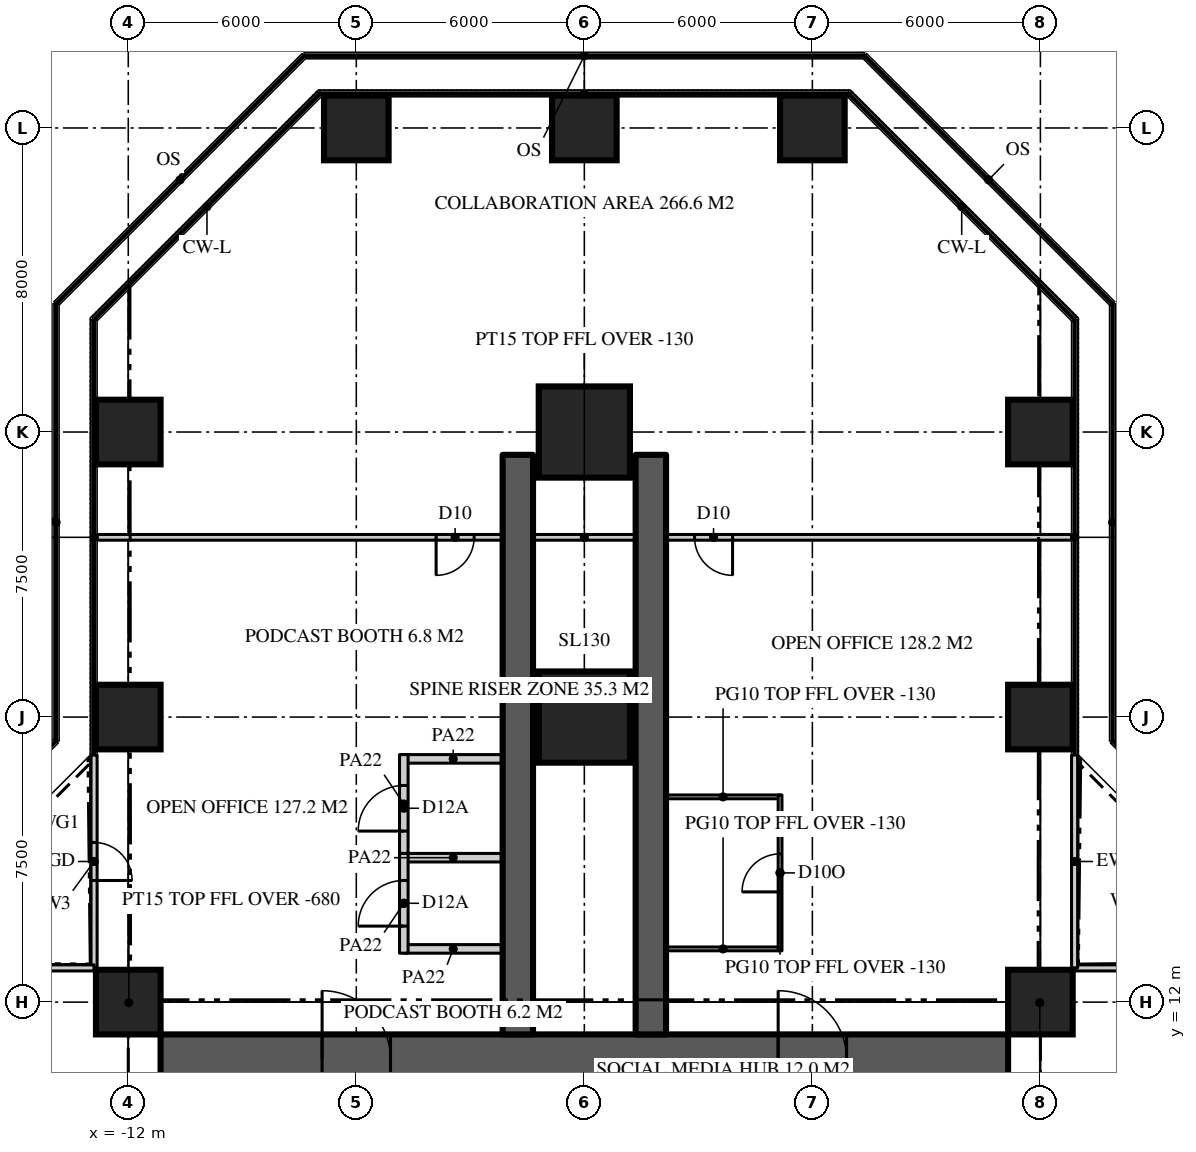
"""IFC4 building model, lengths in metres.
Left out: names, types, materials, properties, quantities, classifications, styles, units other than length and angle.
Written with IfcOpenShell. Run it as: python <this file> out.ifc"""

import sys

from ifc_helpers import new_model, si_unit, direction, frame, frame_2d, origin, origin_2d, place, context, subcontext, project, spatial, rectangle, extrude, element, fill, save


model = new_model("IFC4")
c1 = context("Model", 3, precision=1e-05, world=origin(), true_north=direction((0.0, 1.0)))
c2 = subcontext(c1, "Body", "Model", "MODEL_VIEW")
j1 = project(units=[si_unit("LENGTHUNIT", "METRE"), si_unit("PLANEANGLEUNIT", "RADIAN")], contexts=[c1])
p1 = place(None, origin())
s1 = spatial("IfcSite", under=j1, at=p1, CompositionType="ELEMENT")
p2 = place(p1, origin())
s2 = spatial("IfcBuilding", under=s1, at=p2, CompositionType="ELEMENT")
p3 = place(p2, frame((0.0, 0.0, 74.7)))
s3 = spatial("IfcBuildingStorey", under=s2, at=p3, CompositionType="ELEMENT", Elevation=74.7)
p4 = place(p3, frame((-11.15, 10.5, 0.0), z_axis=(0.0, 0.0, 1.0), x_axis=(1.0, 0.0, 0.0)))
e1 = element("IfcWall", 1, at=p4, inside=s3, PredefinedType="SHEAR", context=c2, shape_type="SweptSolid", body=[
    extrude(rectangle(XDim=22.3, YDim=1.3, at=frame_2d((11.15, 0.0))), origin(), (0.0, 0.0, 1.0), 3.9),
])
p5 = place(p4, frame((4.25, 0.0, 0.0)))
e2 = element("IfcOpeningElement", 2, at=p5, cuts=e1, PredefinedType="OPENING", context=c2, shape_type="SweptSolid", body=[
    extrude(rectangle(XDim=1.8, YDim=2.2, at=frame_2d((0.9, 1.1))), frame((0.0, 0.66, 0.0), z_axis=(0.0, -1.0, 0.0), x_axis=(1.0, 0.0, 0.0)), (0.0, 0.0, 1.0), 1.32),
])
p6 = place(p4, frame((16.25, 0.0, 0.0)))
e3 = element("IfcOpeningElement", 3, at=p6, cuts=e1, PredefinedType="OPENING", context=c2, shape_type="SweptSolid", body=[
    extrude(rectangle(XDim=1.8, YDim=2.2, at=frame_2d((0.9, 1.1))), frame((0.0, 0.66, 0.0), z_axis=(0.0, -1.0, 0.0), x_axis=(1.0, 0.0, 0.0)), (0.0, 0.0, 1.0), 1.32),
])
for number, where, z_axis, x_axis in (
    (4, (1.75, 11.15, 0.0), (0.0, 0.0, 1.0), (0.0, 1.0, 0.0)),
    (5, (-1.75, 11.15, 0.0), (0.0, 0.0, 1.0), (0.0, 1.0, 0.0)),
):
    element("IfcWall", number, at=place(p3, frame(where, z_axis=z_axis, x_axis=x_axis)), inside=s3, PredefinedType="SHEAR", context=c2, shape_type="SweptSolid", body=[
        extrude(rectangle(XDim=15.25, YDim=0.8, at=frame_2d((7.625, 0.0))), origin(), (0.0, 0.0, 1.0), 3.9),
    ])
for number, where, z_axis, x_axis in (
    (6, (-12.0, 12.0, 0.0), (0.0, 0.0, 1.0), (1.0, 0.0, 0.0)),
    (7, (12.0, 12.0, 0.0), (0.0, 0.0, 1.0), (1.0, 0.0, 0.0)),
    (8, (-12.0, 19.5, 0.0), (0.0, 0.0, 1.0), (1.0, 0.0, 0.0)),
):
    element("IfcColumn", number, at=place(p3, frame(where, z_axis=z_axis, x_axis=x_axis)), inside=s3, PredefinedType="COLUMN", context=c2, shape_type="SweptSolid", body=[
        extrude(rectangle(XDim=1.7, YDim=1.7, at=origin_2d()), origin(), (0.0, 0.0, 1.0), 3.9),
    ])
p7 = place(p3, frame((0.0, 19.5, 0.0), z_axis=(0.0, 0.0, 1.0), x_axis=(1.0, 0.0, 0.0)))
e9 = element("IfcColumn", 9, at=p7, inside=s3, PredefinedType="COLUMN", context=c2, shape_type="SweptSolid", body=[
    extrude(rectangle(XDim=2.4, YDim=2.4, at=origin_2d()), origin(), (0.0, 0.0, 1.0), 3.9),
])
for number, where, z_axis, x_axis in (
    (10, (12.0, 19.5, 0.0), (0.0, 0.0, 1.0), (1.0, 0.0, 0.0)),
    (11, (-12.0, 27.0, 0.0), (0.0, 0.0, 1.0), (1.0, 0.0, 0.0)),
):
    element("IfcColumn", number, at=place(p3, frame(where, z_axis=z_axis, x_axis=x_axis)), inside=s3, PredefinedType="COLUMN", context=c2, shape_type="SweptSolid", body=[
        extrude(rectangle(XDim=1.7, YDim=1.7, at=origin_2d()), origin(), (0.0, 0.0, 1.0), 3.9),
    ])
p8 = place(p3, frame((0.0, 27.0, 0.0), z_axis=(0.0, 0.0, 1.0), x_axis=(1.0, 0.0, 0.0)))
e12 = element("IfcColumn", 12, at=p8, inside=s3, PredefinedType="COLUMN", context=c2, shape_type="SweptSolid", body=[
    extrude(rectangle(XDim=2.4, YDim=2.4, at=origin_2d()), origin(), (0.0, 0.0, 1.0), 3.9),
])
for number, where, z_axis, x_axis in (
    (13, (12.0, 27.0, 0.0), (0.0, 0.0, 1.0), (1.0, 0.0, 0.0)),
    (14, (-6.0, 35.0, 0.0), (0.0, 0.0, 1.0), (1.0, 0.0, 0.0)),
    (15, (0.0, 35.0, 0.0), (0.0, 0.0, 1.0), (1.0, 0.0, 0.0)),
    (16, (6.0, 35.0, 0.0), (0.0, 0.0, 1.0), (1.0, 0.0, 0.0)),
):
    element("IfcColumn", number, at=place(p3, frame(where, z_axis=z_axis, x_axis=x_axis)), inside=s3, PredefinedType="COLUMN", context=c2, shape_type="SweptSolid", body=[
        extrude(rectangle(XDim=1.7, YDim=1.7, at=origin_2d()), origin(), (0.0, 0.0, 1.0), 3.9),
    ])
p9 = place(p3, frame((18.5, 12.9, 0.0), z_axis=(0.0, 0.0, 1.0), x_axis=(-1.0, 0.0, 0.0)))
e17 = element("IfcWall", 17, at=p9, inside=s3, PredefinedType="SOLIDWALL", context=c2, shape_type="SweptSolid", body=[
    extrude(rectangle(XDim=5.6, YDim=0.16, at=frame_2d((2.8, 0.0))), origin(), (0.0, 0.0, 1.0), 3.77),
])
p10 = place(p9, frame((2.3, 0.0, 0.0)))
e18 = element("IfcOpeningElement", 18, at=p10, cuts=e17, PredefinedType="OPENING", context=c2, shape_type="SweptSolid", body=[
    extrude(rectangle(XDim=1.0, YDim=2.2, at=frame_2d((0.5, 1.1))), frame((0.0, 0.09, 0.0), z_axis=(0.0, -1.0, 0.0), x_axis=(1.0, 0.0, 0.0)), (0.0, 0.0, 1.0), 0.18),
])
p11 = place(p3, frame((12.9, 12.9, 0.0), z_axis=(0.0, 0.0, 1.0), x_axis=(0.0, 1.0, 0.0)))
e19 = element("IfcWall", 19, at=p11, inside=s3, PredefinedType="SOLIDWALL", context=c2, shape_type="SweptSolid", body=[
    extrude(rectangle(XDim=5.6, YDim=0.16, at=frame_2d((2.8, 0.0))), origin(), (0.0, 0.0, 1.0), 3.77),
])
p12 = place(p3, frame((-12.9, 18.5, 0.0), z_axis=(0.0, 0.0, 1.0), x_axis=(0.0, -1.0, 0.0)))
e20 = element("IfcWall", 20, at=p12, inside=s3, PredefinedType="SOLIDWALL", context=c2, shape_type="SweptSolid", body=[
    extrude(rectangle(XDim=5.6, YDim=0.16, at=frame_2d((2.8, 0.0))), origin(), (0.0, 0.0, 1.0), 3.77),
])
p13 = place(p12, frame((2.3, 0.0, 0.0)))
e21 = element("IfcOpeningElement", 21, at=p13, cuts=e20, PredefinedType="OPENING", context=c2, shape_type="SweptSolid", body=[
    extrude(rectangle(XDim=1.0, YDim=2.2, at=frame_2d((0.5, 1.1))), frame((0.0, 0.09, 0.0), z_axis=(0.0, -1.0, 0.0), x_axis=(1.0, 0.0, 0.0)), (0.0, 0.0, 1.0), 0.18),
])
p14 = place(p3, frame((-12.9, 12.9, 0.0), z_axis=(0.0, 0.0, 1.0), x_axis=(-1.0, 0.0, 0.0)))
e22 = element("IfcWall", 22, at=p14, inside=s3, PredefinedType="SOLIDWALL", context=c2, shape_type="SweptSolid", body=[
    extrude(rectangle(XDim=5.6, YDim=0.16, at=frame_2d((2.8, 0.0))), origin(), (0.0, 0.0, 1.0), 3.77),
])
p15 = place(p3, frame((12.82, 24.229, 0.0), z_axis=(0.0, 0.0, 1.0), x_axis=(-1.0, 0.0, 0.0)))
e23 = element("IfcWall", 23, at=p15, inside=s3, PredefinedType="PARTITIONING", context=c2, shape_type="SweptSolid", body=[
    extrude(rectangle(XDim=25.64, YDim=0.15, at=frame_2d((12.82, 0.0))), origin(), (0.0, 0.0, 1.0), 3.77),
])
p16 = place(p15, frame((15.72, 0.0, 0.0)))
e24 = element("IfcOpeningElement", 24, at=p16, cuts=e23, PredefinedType="OPENING", context=c2, shape_type="SweptSolid", body=[
    extrude(rectangle(XDim=1.0, YDim=2.2, at=frame_2d((0.5, 1.1))), frame((0.0, 0.085, 0.0), z_axis=(0.0, -1.0, 0.0), x_axis=(1.0, 0.0, 0.0)), (0.0, 0.0, 1.0), 0.17),
])
p17 = place(p15, frame((8.92, 0.0, 0.0)))
e25 = element("IfcOpeningElement", 25, at=p17, cuts=e23, PredefinedType="OPENING", context=c2, shape_type="SweptSolid", body=[
    extrude(rectangle(XDim=1.0, YDim=2.2, at=frame_2d((0.5, 1.1))), frame((0.0, 0.085, 0.0), z_axis=(0.0, -1.0, 0.0), x_axis=(1.0, 0.0, 0.0)), (0.0, 0.0, 1.0), 0.17),
])
for number, where, z_axis, x_axis in (
    (26, (-2.15, 13.4, 0.0), (0.0, 0.0, 1.0), (-1.0, 0.0, 0.0)),
    (27, (-2.15, 15.8, 0.0), (0.0, 0.0, 1.0), (-1.0, 0.0, 0.0)),
):
    element("IfcWall", number, at=place(p3, frame(where, z_axis=z_axis, x_axis=x_axis)), inside=s3, PredefinedType="PARTITIONING", context=c2, shape_type="SweptSolid", body=[
        extrude(rectangle(XDim=2.6, YDim=0.225, at=frame_2d((1.3, 0.0))), origin(), (0.0, 0.0, 1.0), 3.77),
    ])
p18 = place(p3, frame((-4.75, 13.288, 0.0), z_axis=(0.0, 0.0, 1.0), x_axis=(0.0, 1.0, 0.0)))
e28 = element("IfcWall", 28, at=p18, inside=s3, PredefinedType="PARTITIONING", context=c2, shape_type="SweptSolid", body=[
    extrude(rectangle(XDim=2.625, YDim=0.225, at=frame_2d((1.312, 0.0))), origin(), (0.0, 0.0, 1.0), 3.77),
])
p19 = place(p18, frame((0.712, 0.0, 0.0)))
e29 = element("IfcOpeningElement", 29, at=p19, cuts=e28, PredefinedType="OPENING", context=c2, shape_type="SweptSolid", body=[
    extrude(rectangle(XDim=1.2, YDim=2.2, at=frame_2d((0.6, 1.1))), frame((0.0, 0.123, 0.0), z_axis=(0.0, -1.0, 0.0), x_axis=(1.0, 0.0, 0.0)), (0.0, 0.0, 1.0), 0.245),
])
p20 = place(p3, frame((-2.15, 18.4, 0.0), z_axis=(0.0, 0.0, 1.0), x_axis=(-1.0, 0.0, 0.0)))
e30 = element("IfcWall", 30, at=p20, inside=s3, PredefinedType="PARTITIONING", context=c2, shape_type="SweptSolid", body=[
    extrude(rectangle(XDim=2.6, YDim=0.225, at=frame_2d((1.3, 0.0))), origin(), (0.0, 0.0, 1.0), 3.77),
])
p21 = place(p3, frame((-4.75, 15.913, 0.0), z_axis=(0.0, 0.0, 1.0), x_axis=(0.0, 1.0, 0.0)))
e31 = element("IfcWall", 31, at=p21, inside=s3, PredefinedType="PARTITIONING", context=c2, shape_type="SweptSolid", body=[
    extrude(rectangle(XDim=2.6, YDim=0.225, at=frame_2d((1.3, 0.0))), origin(), (0.0, 0.0, 1.0), 3.77),
])
p22 = place(p21, frame((0.587, 0.0, 0.0)))
e32 = element("IfcOpeningElement", 32, at=p22, cuts=e31, PredefinedType="OPENING", context=c2, shape_type="SweptSolid", body=[
    extrude(rectangle(XDim=1.2, YDim=2.2, at=frame_2d((0.6, 1.1))), frame((0.0, 0.123, 0.0), z_axis=(0.0, -1.0, 0.0), x_axis=(1.0, 0.0, 0.0)), (0.0, 0.0, 1.0), 0.245),
])
for number, where, z_axis, x_axis in (
    (33, (2.15, 13.4, 0.0), (0.0, 0.0, 1.0), (1.0, 0.0, 0.0)),
    (34, (2.15, 17.4, 0.0), (0.0, 0.0, 1.0), (1.0, 0.0, 0.0)),
):
    element("IfcWall", number, at=place(p3, frame(where, z_axis=z_axis, x_axis=x_axis)), inside=s3, PredefinedType="PARTITIONING", context=c2, shape_type="SweptSolid", body=[
        extrude(rectangle(XDim=3.0, YDim=0.1, at=frame_2d((1.5, 0.0))), origin(), (0.0, 0.0, 1.0), 3.77),
    ])
p23 = place(p3, frame((5.15, 13.35, 0.0), z_axis=(0.0, 0.0, 1.0), x_axis=(0.0, 1.0, 0.0)))
e35 = element("IfcWall", 35, at=p23, inside=s3, PredefinedType="PARTITIONING", context=c2, shape_type="SweptSolid", body=[
    extrude(rectangle(XDim=4.1, YDim=0.1, at=frame_2d((2.05, 0.0))), origin(), (0.0, 0.0, 1.0), 3.77),
])
p24 = place(p23, frame((1.55, 0.0, 0.0)))
e36 = element("IfcOpeningElement", 36, at=p24, cuts=e35, PredefinedType="OPENING", context=c2, shape_type="SweptSolid", body=[
    extrude(rectangle(XDim=1.0, YDim=2.2, at=frame_2d((0.5, 1.1))), frame((0.0, 0.06, 0.0), z_axis=(0.0, -1.0, 0.0), x_axis=(1.0, 0.0, 0.0)), (0.0, 0.0, 1.0), 0.12),
])
for number, where, z_axis, x_axis in (
    (37, (11.15, 11.15, 0.0), (0.0, 0.0, 1.0), (0.707, 0.707, 0.0)),
    (38, (-11.15, 11.15, 0.0), (0.0, 0.0, 1.0), (-0.707, 0.707, 0.0)),
):
    element("IfcWall", number, at=place(p3, frame(where, z_axis=z_axis, x_axis=x_axis)), inside=s3, PredefinedType="PARTITIONING", context=c2, shape_type="SweptSolid", body=[
        extrude(rectangle(XDim=2.362, YDim=0.15, at=frame_2d((1.181, 0.0))), origin(), (0.0, 0.0, 1.0), 3.22),
    ])
p25 = place(p13, origin())
e39 = element("IfcDoor", 39, at=p25, inside=s3, OperationType="SINGLE_SWING_RIGHT", PredefinedType="DOOR", context=c2, shape_type="SweptSolid", body=[
    extrude(rectangle(XDim=1.0, YDim=2.2, at=frame_2d((0.5, 1.1))), frame((0.0, 0.025, 0.0), z_axis=(0.0, -1.0, 0.0), x_axis=(1.0, 0.0, 0.0)), (0.0, 0.0, 1.0), 0.05),
])
fill(e21, e39)
p26 = place(p5, origin())
e40 = element("IfcDoor", 40, at=p26, inside=s3, OperationType="DOUBLE_DOOR_DOUBLE_SWING", PredefinedType="DOOR", context=c2, shape_type="SweptSolid", body=[
    extrude(rectangle(XDim=1.8, YDim=2.2, at=frame_2d((0.9, 1.1))), frame((0.0, 0.025, 0.0), z_axis=(0.0, -1.0, 0.0), x_axis=(1.0, 0.0, 0.0)), (0.0, 0.0, 1.0), 0.05),
])
fill(e2, e40)
p27 = place(p6, origin())
e41 = element("IfcDoor", 41, at=p27, inside=s3, OperationType="DOUBLE_DOOR_DOUBLE_SWING", PredefinedType="DOOR", context=c2, shape_type="SweptSolid", body=[
    extrude(rectangle(XDim=1.8, YDim=2.2, at=frame_2d((0.9, 1.1))), frame((0.0, 0.025, 0.0), z_axis=(0.0, -1.0, 0.0), x_axis=(1.0, 0.0, 0.0)), (0.0, 0.0, 1.0), 0.05),
])
fill(e3, e41)
p28 = place(p16, origin())
e42 = element("IfcDoor", 42, at=p28, inside=s3, OperationType="SINGLE_SWING_RIGHT", PredefinedType="DOOR", context=c2, shape_type="SweptSolid", body=[
    extrude(rectangle(XDim=1.0, YDim=2.2, at=frame_2d((0.5, 1.1))), frame((0.0, 0.025, 0.0), z_axis=(0.0, -1.0, 0.0), x_axis=(1.0, 0.0, 0.0)), (0.0, 0.0, 1.0), 0.05),
])
fill(e24, e42)
p29 = place(p17, origin())
e43 = element("IfcDoor", 43, at=p29, inside=s3, OperationType="SINGLE_SWING_LEFT", PredefinedType="DOOR", context=c2, shape_type="SweptSolid", body=[
    extrude(rectangle(XDim=1.0, YDim=2.2, at=frame_2d((0.5, 1.1))), frame((0.0, 0.025, 0.0), z_axis=(0.0, -1.0, 0.0), x_axis=(1.0, 0.0, 0.0)), (0.0, 0.0, 1.0), 0.05),
])
fill(e25, e43)
p30 = place(p19, origin())
e44 = element("IfcDoor", 44, at=p30, inside=s3, OperationType="SINGLE_SWING_LEFT", PredefinedType="DOOR", context=c2, shape_type="SweptSolid", body=[
    extrude(rectangle(XDim=1.2, YDim=2.2, at=frame_2d((0.6, 1.1))), frame((0.0, 0.025, 0.0), z_axis=(0.0, -1.0, 0.0), x_axis=(1.0, 0.0, 0.0)), (0.0, 0.0, 1.0), 0.05),
])
fill(e29, e44)
p31 = place(p22, origin())
e45 = element("IfcDoor", 45, at=p31, inside=s3, OperationType="SINGLE_SWING_LEFT", PredefinedType="DOOR", context=c2, shape_type="SweptSolid", body=[
    extrude(rectangle(XDim=1.2, YDim=2.2, at=frame_2d((0.6, 1.1))), frame((0.0, 0.025, 0.0), z_axis=(0.0, -1.0, 0.0), x_axis=(1.0, 0.0, 0.0)), (0.0, 0.0, 1.0), 0.05),
])
fill(e32, e45)
p32 = place(p24, origin())
e46 = element("IfcDoor", 46, at=p32, inside=s3, OperationType="SINGLE_SWING_LEFT", PredefinedType="DOOR", context=c2, shape_type="SweptSolid", body=[
    extrude(rectangle(XDim=1.0, YDim=2.2, at=frame_2d((0.5, 1.1))), frame((0.0, 0.025, 0.0), z_axis=(0.0, -1.0, 0.0), x_axis=(1.0, 0.0, 0.0)), (0.0, 0.0, 1.0), 0.05),
])
fill(e36, e46)
save(model, sys.argv[1])
